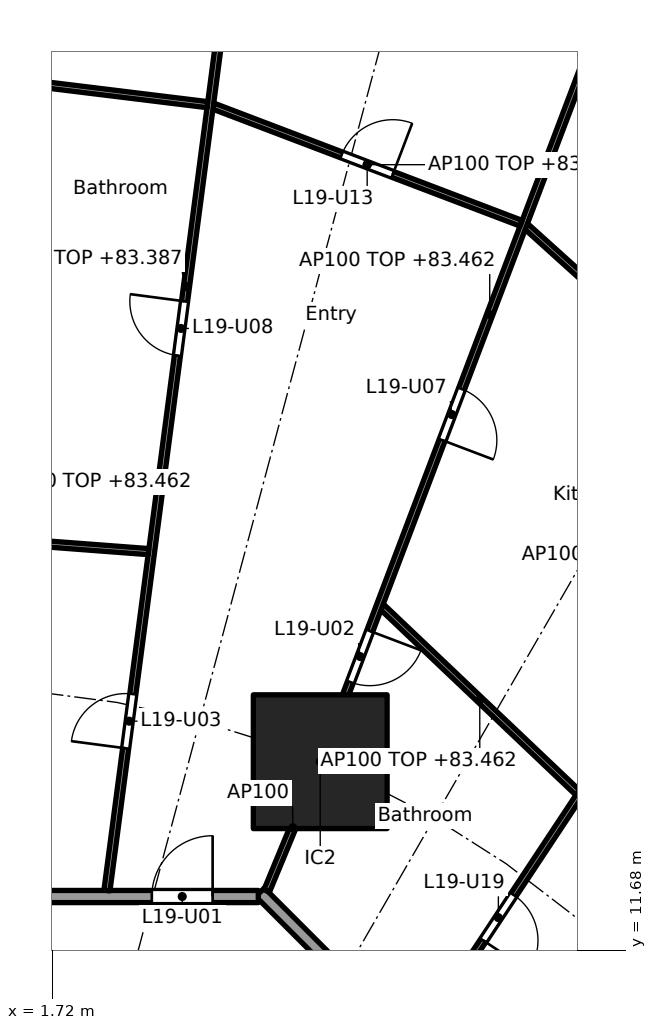
"""IFC4 building model, lengths in metres.
Left out: names, types, materials, properties, quantities, classifications, styles, units other than length and angle.
Written with IfcOpenShell. Run it as: python <this file> out.ifc"""

import sys

from ifc_helpers import new_model, si_unit, direction, frame, frame_2d, origin, origin_2d, place, context, subcontext, project, spatial, rectangle, extrude, element, fill, save


model = new_model("IFC4")
c1 = context("Model", 3, precision=1e-05, world=origin(), true_north=direction((0.0, 1.0)))
c2 = subcontext(c1, "Body", "Model", "MODEL_VIEW")
j1 = project(units=[si_unit("LENGTHUNIT", "METRE"), si_unit("PLANEANGLEUNIT", "RADIAN")], contexts=[c1])
p1 = place(None, origin())
s1 = spatial("IfcSite", under=j1, at=p1, CompositionType="ELEMENT")
p2 = place(p1, origin())
s2 = spatial("IfcBuilding", under=s1, at=p2, CompositionType="ELEMENT")
p3 = place(p2, frame((0.0, 0.0, 80.7)))
s3 = spatial("IfcBuildingStorey", under=s2, at=p3, CompositionType="ELEMENT", Elevation=80.7)
p4 = place(p3, frame((6.123, 14.782, 0.0), z_axis=(0.0, 0.0, 1.0), x_axis=(1.0, 0.0, 0.0)))
e1 = element("IfcColumn", 1, at=p4, inside=s3, PredefinedType="COLUMN", context=c2, shape_type="SweptSolid", body=[
    extrude(rectangle(XDim=2.2, YDim=2.2, at=origin_2d()), origin(), (0.0, 0.0, 1.0), 3.7),
])
p5 = place(p3, frame((12.635, 5.134, 0.0), z_axis=(0.0, 0.0, 1.0), x_axis=(-0.707106781187, 0.707106781187, 0.0)))
e2 = element("IfcWall", 2, at=p5, inside=s3, PredefinedType="PARTITIONING", context=c2, shape_type="SweptSolid", body=[
    extrude(rectangle(XDim=10.609, YDim=0.2, at=frame_2d((5.305, 0.0))), origin(), (0.0, 0.0, 1.0), 3.44),
])
p6 = place(p3, frame((5.104, 12.565, 0.0), z_axis=(0.0, 0.0, 1.0), x_axis=(-1.0, 0.0, 0.0)))
e3 = element("IfcWall", 3, at=p6, inside=s3, PredefinedType="PARTITIONING", context=c2, shape_type="SweptSolid", body=[
    extrude(rectangle(XDim=10.409, YDim=0.2, at=frame_2d((5.205, 0.0))), origin(), (0.0, 0.0, 1.0), 3.44),
])
p7 = place(p6, frame((0.751, 0.0, 0.0)))
e4 = element("IfcOpeningElement", 4, at=p7, cuts=e3, PredefinedType="OPENING", context=c2, shape_type="SweptSolid", body=[
    extrude(rectangle(XDim=1.0, YDim=2.1, at=frame_2d((0.5, 1.05))), frame((0.0, 0.11, 0.0), z_axis=(0.0, -1.0, 0.0), x_axis=(1.0, 0.0, 0.0)), (0.0, 0.0, 1.0), 0.22),
])
p8 = place(p3, frame((7.713, 10.195, 0.0), z_axis=(0.0, 0.0, 1.0), x_axis=(0.552111071171, 0.833770571015, 0.0)))
e5 = element("IfcWall", 5, at=p8, inside=s3, PredefinedType="PARTITIONING", context=c2, shape_type="SweptSolid", body=[
    extrude(rectangle(XDim=17.208, YDim=0.1, at=frame_2d((8.604, 0.0))), origin(), (0.0, 0.0, 1.0), 2.687),
])
p9 = place(p8, frame((1.976, 0.0, 0.0)))
e6 = element("IfcOpeningElement", 6, at=p9, cuts=e5, PredefinedType="OPENING", context=c2, shape_type="SweptSolid", body=[
    extrude(rectangle(XDim=0.9, YDim=2.1, at=frame_2d((0.45, 1.05))), frame((0.0, 0.06, 0.0), z_axis=(0.0, -1.0, 0.0), x_axis=(1.0, 0.0, 0.0)), (0.0, 0.0, 1.0), 0.12),
])
p10 = place(p8, frame((7.611, 0.0, 0.0)))
e7 = element("IfcOpeningElement", 7, at=p10, cuts=e5, PredefinedType="OPENING", context=c2, shape_type="SweptSolid", body=[
    extrude(rectangle(XDim=0.9, YDim=2.1, at=frame_2d((0.45, 1.05))), frame((0.0, 0.06, 0.0), z_axis=(0.0, -1.0, 0.0), x_axis=(1.0, 0.0, 0.0)), (0.0, 0.0, 1.0), 0.12),
])
p11 = place(p3, frame((10.355, 14.274, 0.0), z_axis=(0.0, 0.0, 1.0), x_axis=(-0.725219204328, 0.688518050361, 0.0)))
e8 = element("IfcWall", 8, at=p11, inside=s3, PredefinedType="PARTITIONING", context=c2, shape_type="SweptSolid", body=[
    extrude(rectangle(XDim=4.437, YDim=0.1, at=frame_2d((2.219, 0.0))), origin(), (0.0, 0.0, 1.0), 2.762),
])
p12 = place(p3, frame((13.898, 19.625, 0.0), z_axis=(0.0, 0.0, 1.0), x_axis=(-0.742400132046, 0.669956747812, 0.0)))
e9 = element("IfcWall", 9, at=p12, inside=s3, PredefinedType="PARTITIONING", context=c2, shape_type="SweptSolid", body=[
    extrude(rectangle(XDim=5.911, YDim=0.1, at=frame_2d((2.956, 0.0))), origin(), (0.0, 0.0, 1.0), 2.762),
])
p13 = place(p12, frame((2.506, 0.0, 0.0)))
e10 = element("IfcOpeningElement", 10, at=p13, cuts=e9, PredefinedType="OPENING", context=c2, shape_type="SweptSolid", body=[
    extrude(rectangle(XDim=0.9, YDim=2.1, at=frame_2d((0.45, 1.05))), frame((0.0, 0.06, 0.0), z_axis=(0.0, -1.0, 0.0), x_axis=(1.0, 0.0, 0.0)), (0.0, 0.0, 1.0), 0.12),
])
p14 = place(p3, frame((5.243, 12.657, 0.0), z_axis=(0.0, 0.0, 1.0), x_axis=(0.382719158442, 0.923864733477, 0.0)))
e11 = element("IfcWall", 11, at=p14, inside=s3, PredefinedType="PARTITIONING", context=c2, shape_type="SweptSolid", body=[
    extrude(rectangle(XDim=2.25, YDim=0.1, at=frame_2d((1.125, 0.0))), origin(), (0.0, 0.0, 1.0), 3.44),
])
p15 = place(p3, frame((6.141, 14.829, 0.0), z_axis=(0.0, 0.0, 1.0), x_axis=(0.354477134193, 0.935064682968, 0.0)))
e12 = element("IfcWall", 12, at=p15, inside=s3, PredefinedType="PARTITIONING", context=c2, shape_type="SweptSolid", body=[
    extrude(rectangle(XDim=15.626, YDim=0.1, at=frame_2d((7.813, 0.0))), origin(), (0.0, 0.0, 1.0), 2.762),
])
p16 = place(p15, frame((1.35, 0.0, 0.0)))
e13 = element("IfcOpeningElement", 13, at=p16, cuts=e12, PredefinedType="OPENING", context=c2, shape_type="SweptSolid", body=[
    extrude(rectangle(XDim=0.9, YDim=2.1, at=frame_2d((0.45, 1.05))), frame((0.0, 0.06, 0.0), z_axis=(0.0, -1.0, 0.0), x_axis=(1.0, 0.0, 0.0)), (0.0, 0.0, 1.0), 0.12),
])
p17 = place(p15, frame((5.606, 0.0, 0.0)))
e14 = element("IfcOpeningElement", 14, at=p17, cuts=e12, PredefinedType="OPENING", context=c2, shape_type="SweptSolid", body=[
    extrude(rectangle(XDim=0.9, YDim=2.1, at=frame_2d((0.45, 1.05))), frame((0.0, 0.06, 0.0), z_axis=(0.0, -1.0, 0.0), x_axis=(1.0, 0.0, 0.0)), (0.0, 0.0, 1.0), 0.12),
])
p18 = place(p3, frame((9.426, 23.637, 0.0), z_axis=(0.0, 0.0, 1.0), x_axis=(-0.93461405629, 0.355663557011, 0.0)))
e15 = element("IfcWall", 15, at=p18, inside=s3, PredefinedType="PARTITIONING", context=c2, shape_type="SweptSolid", body=[
    extrude(rectangle(XDim=5.417, YDim=0.1, at=frame_2d((2.708, 0.0))), origin(), (0.0, 0.0, 1.0), 2.762),
])
p19 = place(p18, frame((2.258, 0.0, 0.0)))
e16 = element("IfcOpeningElement", 16, at=p19, cuts=e15, PredefinedType="OPENING", context=c2, shape_type="SweptSolid", body=[
    extrude(rectangle(XDim=0.9, YDim=2.1, at=frame_2d((0.45, 1.05))), frame((0.0, 0.06, 0.0), z_axis=(0.0, -1.0, 0.0), x_axis=(1.0, 0.0, 0.0)), (0.0, 0.0, 1.0), 0.12),
])
p20 = place(p3, frame((2.615, 12.664, 0.0), z_axis=(0.0, 0.0, 1.0), x_axis=(0.130614967904, 0.99143316979, 0.0)))
e17 = element("IfcWall", 17, at=p20, inside=s3, PredefinedType="PARTITIONING", context=c2, shape_type="SweptSolid", body=[
    extrude(rectangle(XDim=20.034, YDim=0.1, at=frame_2d((10.017, 0.0))), origin(), (0.0, 0.0, 1.0), 2.687),
])
p21 = place(p20, frame((2.359, 0.0, 0.0)))
e18 = element("IfcOpeningElement", 18, at=p21, cuts=e17, PredefinedType="OPENING", context=c2, shape_type="SweptSolid", body=[
    extrude(rectangle(XDim=0.9, YDim=2.1, at=frame_2d((0.45, 1.05))), frame((0.0, 0.06, 0.0), z_axis=(0.0, -1.0, 0.0), x_axis=(1.0, 0.0, 0.0)), (0.0, 0.0, 1.0), 0.12),
])
p22 = place(p20, frame((8.873, 0.0, 0.0)))
e19 = element("IfcOpeningElement", 19, at=p22, cuts=e17, PredefinedType="OPENING", context=c2, shape_type="SweptSolid", body=[
    extrude(rectangle(XDim=0.9, YDim=2.1, at=frame_2d((0.45, 1.05))), frame((0.0, 0.06, 0.0), z_axis=(0.0, -1.0, 0.0), x_axis=(1.0, 0.0, 0.0)), (0.0, 0.0, 1.0), 0.12),
])
p23 = place(p3, frame((3.299, 18.237, 0.0), z_axis=(0.0, 0.0, 1.0), x_axis=(-0.997152243414, 0.075414875552, 0.0)))
e20 = element("IfcWall", 20, at=p23, inside=s3, PredefinedType="PARTITIONING", context=c2, shape_type="SweptSolid", body=[
    extrude(rectangle(XDim=3.846, YDim=0.1, at=frame_2d((1.923, 0.0))), origin(), (0.0, 0.0, 1.0), 2.762),
])
p24 = place(p3, frame((4.267, 25.587, 0.0), z_axis=(0.0, 0.0, 1.0), x_axis=(-0.992576206119, 0.121624319302, 0.0)))
e21 = element("IfcWall", 21, at=p24, inside=s3, PredefinedType="PARTITIONING", context=c2, shape_type="SweptSolid", body=[
    extrude(rectangle(XDim=5.374, YDim=0.1, at=frame_2d((2.687, 0.0))), origin(), (0.0, 0.0, 1.0), 2.762),
])
p25 = place(p7, frame((1.0, 0.0, 0.0), x_axis=(-1.0, 0.0, 0.0)))
e22 = element("IfcDoor", 22, at=p25, inside=s3, OperationType="SINGLE_SWING_RIGHT", PredefinedType="DOOR", context=c2, shape_type="SweptSolid", body=[
    extrude(rectangle(XDim=1.0, YDim=2.1, at=frame_2d((0.5, 1.05))), frame((0.0, 0.025, 0.0), z_axis=(0.0, -1.0, 0.0), x_axis=(1.0, 0.0, 0.0)), (0.0, 0.0, 1.0), 0.05),
])
fill(e4, e22)
p26 = place(p16, frame((0.9, 0.0, 0.0), x_axis=(-1.0, 0.0, 0.0)))
e23 = element("IfcDoor", 23, at=p26, inside=s3, OperationType="SINGLE_SWING_LEFT", PredefinedType="DOOR", context=c2, shape_type="SweptSolid", body=[
    extrude(rectangle(XDim=0.9, YDim=2.1, at=frame_2d((0.45, 1.05))), frame((0.0, 0.025, 0.0), z_axis=(0.0, -1.0, 0.0), x_axis=(1.0, 0.0, 0.0)), (0.0, 0.0, 1.0), 0.05),
])
fill(e13, e23)
p27 = place(p21, origin())
e24 = element("IfcDoor", 24, at=p27, inside=s3, OperationType="SINGLE_SWING_LEFT", PredefinedType="DOOR", context=c2, shape_type="SweptSolid", body=[
    extrude(rectangle(XDim=0.9, YDim=2.1, at=frame_2d((0.45, 1.05))), frame((0.0, 0.025, 0.0), z_axis=(0.0, -1.0, 0.0), x_axis=(1.0, 0.0, 0.0)), (0.0, 0.0, 1.0), 0.05),
])
fill(e18, e24)
p28 = place(p17, frame((0.9, 0.0, 0.0), x_axis=(-1.0, 0.0, 0.0)))
e25 = element("IfcDoor", 25, at=p28, inside=s3, OperationType="SINGLE_SWING_RIGHT", PredefinedType="DOOR", context=c2, shape_type="SweptSolid", body=[
    extrude(rectangle(XDim=0.9, YDim=2.1, at=frame_2d((0.45, 1.05))), frame((0.0, 0.025, 0.0), z_axis=(0.0, -1.0, 0.0), x_axis=(1.0, 0.0, 0.0)), (0.0, 0.0, 1.0), 0.05),
])
fill(e14, e25)
p29 = place(p22, origin())
e26 = element("IfcDoor", 26, at=p29, inside=s3, OperationType="SINGLE_SWING_RIGHT", PredefinedType="DOOR", context=c2, shape_type="SweptSolid", body=[
    extrude(rectangle(XDim=0.9, YDim=2.1, at=frame_2d((0.45, 1.05))), frame((0.0, 0.025, 0.0), z_axis=(0.0, -1.0, 0.0), x_axis=(1.0, 0.0, 0.0)), (0.0, 0.0, 1.0), 0.05),
])
fill(e19, e26)
p30 = place(p19, frame((0.9, 0.0, 0.0), x_axis=(-1.0, 0.0, 0.0)))
e27 = element("IfcDoor", 27, at=p30, inside=s3, OperationType="SINGLE_SWING_RIGHT", PredefinedType="DOOR", context=c2, shape_type="SweptSolid", body=[
    extrude(rectangle(XDim=0.9, YDim=2.1, at=frame_2d((0.45, 1.05))), frame((0.0, 0.025, 0.0), z_axis=(0.0, -1.0, 0.0), x_axis=(1.0, 0.0, 0.0)), (0.0, 0.0, 1.0), 0.05),
])
fill(e16, e27)
p31 = place(p9, frame((0.9, 0.0, 0.0), x_axis=(-1.0, 0.0, 0.0)))
e28 = element("IfcDoor", 28, at=p31, inside=s3, OperationType="SINGLE_SWING_RIGHT", PredefinedType="DOOR", context=c2, shape_type="SweptSolid", body=[
    extrude(rectangle(XDim=0.9, YDim=2.1, at=frame_2d((0.45, 1.05))), frame((0.0, 0.025, 0.0), z_axis=(0.0, -1.0, 0.0), x_axis=(1.0, 0.0, 0.0)), (0.0, 0.0, 1.0), 0.05),
])
fill(e6, e28)
save(model, sys.argv[1])
